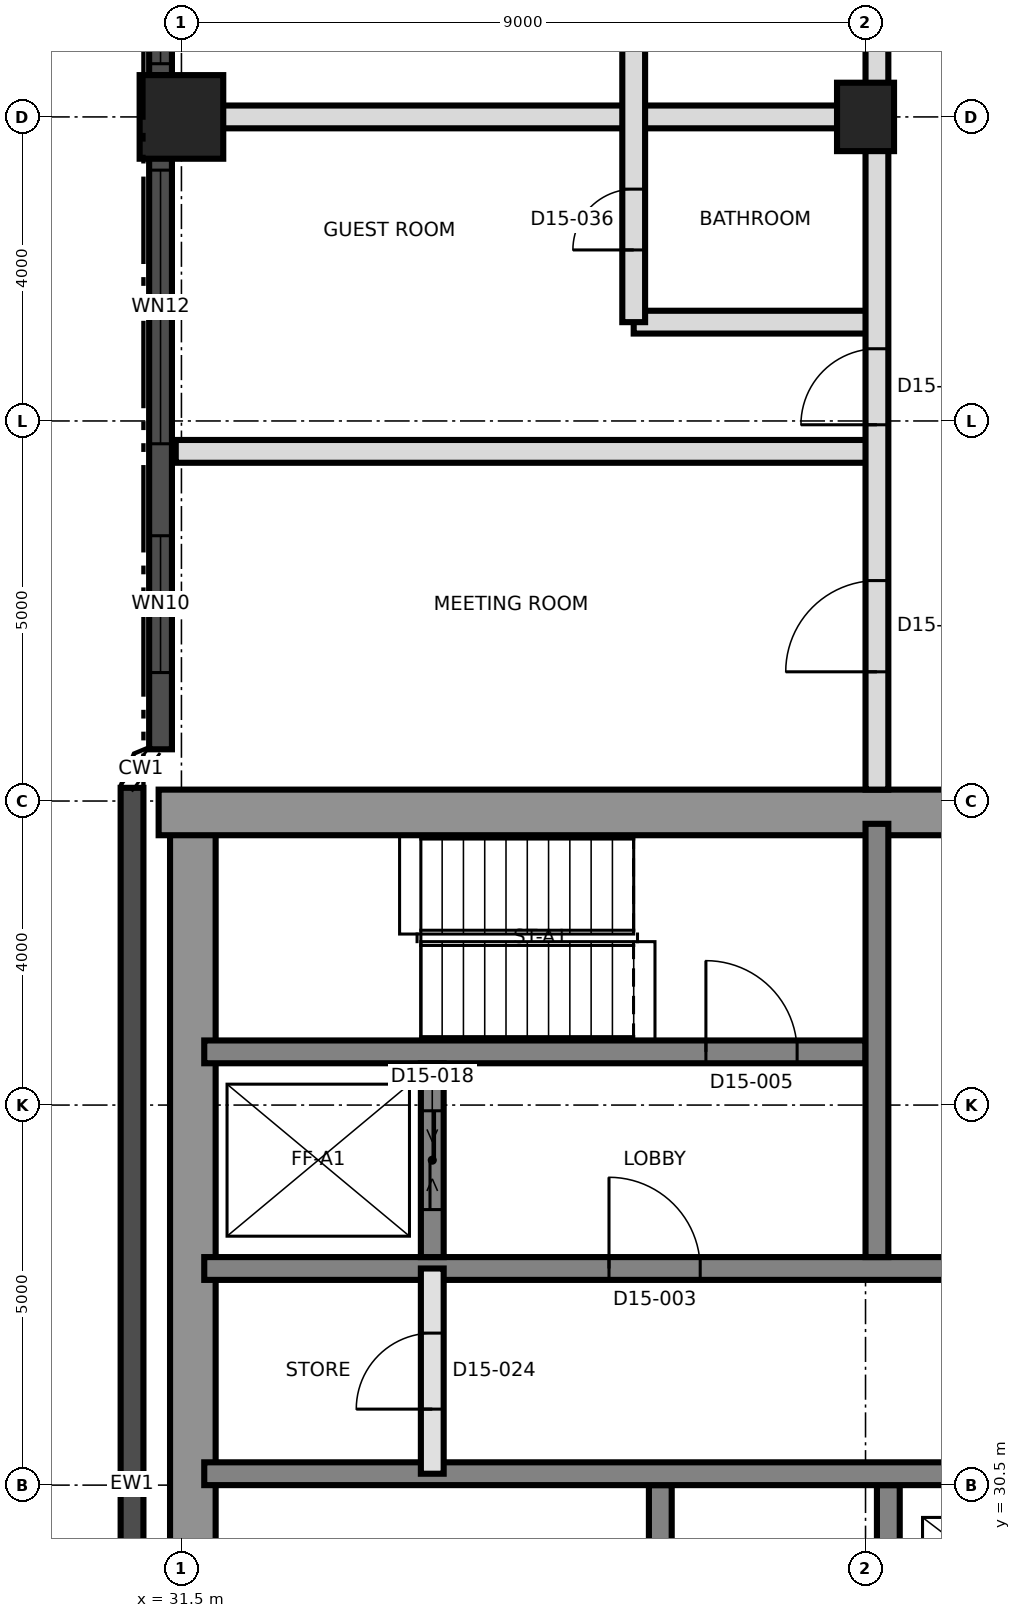
"""IFC4 building model, lengths in metres.
Left out: names, types, materials, properties, quantities, classifications, styles, units other than length and angle.
Written with IfcOpenShell. Run it as: python <this file> out.ifc"""

import sys

from ifc_helpers import new_model, si_unit, direction, frame, frame_2d, origin, origin_2d, place, context, subcontext, project, spatial, rectangle, extrude, element, fill, save


model = new_model("IFC4")
c1 = context("Model", 3, precision=1e-05, world=origin(), true_north=direction((0.0, 1.0)))
c2 = subcontext(c1, "Body", "Model", "MODEL_VIEW")
j1 = project(units=[si_unit("LENGTHUNIT", "METRE"), si_unit("PLANEANGLEUNIT", "RADIAN")], contexts=[c1])
p1 = place(None, origin())
s1 = spatial("IfcSite", under=j1, at=p1, CompositionType="ELEMENT")
p2 = place(p1, origin())
s2 = spatial("IfcBuilding", under=s1, at=p2, CompositionType="ELEMENT")
p3 = place(p2, frame((0.0, 0.0, 153.3)))
s3 = spatial("IfcBuildingStorey", under=s2, at=p3, CompositionType="ELEMENT", Elevation=153.3)
p4 = place(p3, frame((31.65, 21.8, 0.0), z_axis=(0.0, 0.0, 1.0), x_axis=(0.0, 1.0, 0.0)))
e1 = element("IfcWall", 1, at=p4, inside=s3, PredefinedType="SHEAR", context=c2, shape_type="SweptSolid", body=[
    extrude(rectangle(XDim=17.4, YDim=0.6, at=frame_2d((8.7, 0.0))), origin(), (0.0, 0.0, 1.0), 3.7),
])
p5 = place(p3, frame((31.2, 39.35, 0.0), z_axis=(0.0, 0.0, 1.0), x_axis=(1.0, 0.0, 0.0)))
e2 = element("IfcWall", 2, at=p5, inside=s3, PredefinedType="SHEAR", context=c2, shape_type="SweptSolid", body=[
    extrude(rectangle(XDim=27.0, YDim=0.6, at=frame_2d((13.5, 0.0))), origin(), (0.0, 0.0, 1.0), 3.7),
])
p6 = place(p5, frame((10.5, 0.0, 0.0)))
e3 = element("IfcOpeningElement", 3, at=p6, cuts=e2, PredefinedType="OPENING", context=c2, shape_type="SweptSolid", body=[
    extrude(rectangle(XDim=1.2, YDim=2.1, at=frame_2d((0.6, 1.05))), frame((0.0, 0.31, 0.0), z_axis=(0.0, -1.0, 0.0), x_axis=(1.0, 0.0, 0.0)), (0.0, 0.0, 1.0), 0.62),
])
p7 = place(p3, frame((37.8, 21.8, 0.0), z_axis=(0.0, 0.0, 1.0), x_axis=(0.0, 1.0, 0.0)))
e4 = element("IfcWall", 4, at=p7, inside=s3, PredefinedType="SHEAR", context=c2, shape_type="SweptSolid", body=[
    extrude(rectangle(XDim=8.7, YDim=0.3, at=frame_2d((4.35, 0.0))), origin(), (0.0, 0.0, 1.0), 3.7),
])
p8 = place(p7, frame((5.475, 0.0, 0.0)))
e5 = element("IfcOpeningElement", 5, at=p8, cuts=e4, PredefinedType="OPENING", context=c2, shape_type="SweptSolid", body=[
    extrude(rectangle(XDim=1.0, YDim=2.1, at=frame_2d((0.5, 1.05))), frame((0.0, 0.16, 0.0), z_axis=(0.0, -1.0, 0.0), x_axis=(1.0, 0.0, 0.0)), (0.0, 0.0, 1.0), 0.32),
])
p9 = place(p3, frame((40.8, 21.8, 0.0), z_axis=(0.0, 0.0, 1.0), x_axis=(0.0, 1.0, 0.0)))
e6 = element("IfcWall", 6, at=p9, inside=s3, PredefinedType="SHEAR", context=c2, shape_type="SweptSolid", body=[
    extrude(rectangle(XDim=8.7, YDim=0.3, at=frame_2d((4.35, 0.0))), origin(), (0.0, 0.0, 1.0), 3.7),
])
p10 = place(p9, frame((3.85, 0.0, 0.0)))
e7 = element("IfcOpeningElement", 7, at=p10, cuts=e6, PredefinedType="OPENING", context=c2, shape_type="SweptSolid", body=[
    extrude(rectangle(XDim=1.5, YDim=2.1, at=frame_2d((0.75, 1.05))), frame((0.0, 0.16, 0.0), z_axis=(0.0, -1.0, 0.0), x_axis=(1.0, 0.0, 0.0)), (0.0, 0.0, 1.0), 0.32),
])
p11 = place(p3, frame((31.8, 30.65, 0.0), z_axis=(0.0, 0.0, 1.0), x_axis=(1.0, 0.0, 0.0)))
e8 = element("IfcWall", 8, at=p11, inside=s3, PredefinedType="SHEAR", context=c2, shape_type="SweptSolid", body=[
    extrude(rectangle(XDim=26.4, YDim=0.3, at=frame_2d((13.2, 0.0))), origin(), (0.0, 0.0, 1.0), 3.7),
])
p12 = place(p11, frame((24.7, 0.0, 0.0)))
e9 = element("IfcOpeningElement", 9, at=p12, cuts=e8, PredefinedType="OPENING", context=c2, shape_type="SweptSolid", body=[
    extrude(rectangle(XDim=1.0, YDim=2.1, at=frame_2d((0.5, 1.05))), frame((0.0, 0.16, 0.0), z_axis=(0.0, -1.0, 0.0), x_axis=(1.0, 0.0, 0.0)), (0.0, 0.0, 1.0), 0.32),
])
p13 = place(p3, frame((31.8, 33.35, 0.0), z_axis=(0.0, 0.0, 1.0), x_axis=(1.0, 0.0, 0.0)))
e10 = element("IfcWall", 10, at=p13, inside=s3, PredefinedType="SHEAR", context=c2, shape_type="SweptSolid", body=[
    extrude(rectangle(XDim=26.4, YDim=0.3, at=frame_2d((13.2, 0.0))), origin(), (0.0, 0.0, 1.0), 3.7),
])
p14 = place(p13, frame((13.85, 0.0, 0.0)))
e11 = element("IfcOpeningElement", 11, at=p14, cuts=e10, PredefinedType="OPENING", context=c2, shape_type="SweptSolid", body=[
    extrude(rectangle(XDim=1.4, YDim=2.1, at=frame_2d((0.7, 1.05))), frame((0.0, 0.16, 0.0), z_axis=(0.0, -1.0, 0.0), x_axis=(1.0, 0.0, 0.0)), (0.0, 0.0, 1.0), 0.32),
])
p15 = place(p13, frame((5.325, 0.0, 0.0)))
e12 = element("IfcOpeningElement", 12, at=p15, cuts=e10, PredefinedType="OPENING", context=c2, shape_type="SweptSolid", body=[
    extrude(rectangle(XDim=1.2, YDim=2.1, at=frame_2d((0.6, 1.05))), frame((0.0, 0.16, 0.0), z_axis=(0.0, -1.0, 0.0), x_axis=(1.0, 0.0, 0.0)), (0.0, 0.0, 1.0), 0.32),
])
p16 = place(p13, frame((19.875, 0.0, 0.0)))
e13 = element("IfcOpeningElement", 13, at=p16, cuts=e10, PredefinedType="OPENING", context=c2, shape_type="SweptSolid", body=[
    extrude(rectangle(XDim=1.2, YDim=2.1, at=frame_2d((0.6, 1.05))), frame((0.0, 0.16, 0.0), z_axis=(0.0, -1.0, 0.0), x_axis=(1.0, 0.0, 0.0)), (0.0, 0.0, 1.0), 0.32),
])
p17 = place(p3, frame((31.8, 36.2, 0.0), z_axis=(0.0, 0.0, 1.0), x_axis=(1.0, 0.0, 0.0)))
e14 = element("IfcWall", 14, at=p17, inside=s3, PredefinedType="SHEAR", context=c2, shape_type="SweptSolid", body=[
    extrude(rectangle(XDim=8.7, YDim=0.3, at=frame_2d((4.35, 0.0))), origin(), (0.0, 0.0, 1.0), 3.7),
])
p18 = place(p17, frame((6.6, 0.0, 0.0)))
e15 = element("IfcOpeningElement", 15, at=p18, cuts=e14, PredefinedType="OPENING", context=c2, shape_type="SweptSolid", body=[
    extrude(rectangle(XDim=1.2, YDim=2.1, at=frame_2d((0.6, 1.05))), frame((0.0, 0.16, 0.0), z_axis=(0.0, -1.0, 0.0), x_axis=(1.0, 0.0, 0.0)), (0.0, 0.0, 1.0), 0.32),
])
p19 = place(p3, frame((40.65, 33.5, 0.0), z_axis=(0.0, 0.0, 1.0), x_axis=(0.0, 1.0, 0.0)))
e16 = element("IfcWall", 16, at=p19, inside=s3, PredefinedType="SHEAR", context=c2, shape_type="SweptSolid", body=[
    extrude(rectangle(XDim=5.7, YDim=0.3, at=frame_2d((2.85, 0.0))), origin(), (0.0, 0.0, 1.0), 3.7),
])
p20 = place(p3, frame((34.8, 33.5, 0.0), z_axis=(0.0, 0.0, 1.0), x_axis=(0.0, 1.0, 0.0)))
e17 = element("IfcWall", 17, at=p20, inside=s3, PredefinedType="SHEAR", context=c2, shape_type="SweptSolid", body=[
    extrude(rectangle(XDim=2.55, YDim=0.3, at=frame_2d((1.275, 0.0))), origin(), (0.0, 0.0, 1.0), 3.7),
])
p21 = place(p20, frame((0.625, 0.0, 0.0)))
e18 = element("IfcOpeningElement", 18, at=p21, cuts=e17, PredefinedType="OPENING", context=c2, shape_type="SweptSolid", body=[
    extrude(rectangle(XDim=1.3, YDim=2.4, at=frame_2d((0.65, 1.2))), frame((0.0, 0.16, 0.0), z_axis=(0.0, -1.0, 0.0), x_axis=(1.0, 0.0, 0.0)), (0.0, 0.0, 1.0), 0.32),
])
p22 = place(p3, frame((31.5, 48.5, 0.0), z_axis=(0.0, 0.0, 1.0), x_axis=(1.0, 0.0, 0.0)))
e19 = element("IfcColumn", 19, at=p22, inside=s3, PredefinedType="COLUMN", context=c2, shape_type="SweptSolid", body=[
    extrude(rectangle(XDim=1.1, YDim=1.1, at=origin_2d()), origin(), (0.0, 0.0, 1.0), 3.7),
])
p23 = place(p3, frame((40.5, 48.5, 0.0), z_axis=(0.0, 0.0, 1.0), x_axis=(0.0, 1.0, 0.0)))
e20 = element("IfcColumn", 20, at=p23, inside=s3, PredefinedType="COLUMN", context=c2, shape_type="SweptSolid", body=[
    extrude(rectangle(XDim=0.9, YDim=0.75, at=origin_2d()), origin(), (0.0, 0.0, 1.0), 3.7),
])
p24 = place(p3, frame((31.225, 56.95, 0.0), z_axis=(0.0, 0.0, 1.0), x_axis=(0.0, -1.0, 0.0)))
e21 = element("IfcWall", 21, at=p24, inside=s3, PredefinedType="SOLIDWALL", context=c2, shape_type="SweptSolid", body=[
    extrude(rectangle(XDim=7.9, YDim=0.3, at=frame_2d((3.95, 0.0))), origin(), (0.0, 0.0, 1.0), 2.8),
])
p25 = place(p24, frame((0.15, 0.0, 0.9)))
e22 = element("IfcOpeningElement", 22, at=p25, cuts=e21, PredefinedType="OPENING", context=c2, shape_type="SweptSolid", body=[
    extrude(rectangle(XDim=3.6, YDim=1.5, at=frame_2d((1.8, 0.75))), frame((0.0, 0.16, 0.0), z_axis=(0.0, -1.0, 0.0), x_axis=(1.0, 0.0, 0.0)), (0.0, 0.0, 1.0), 0.32),
])
p26 = place(p24, frame((4.15, 0.0, 0.9)))
e23 = element("IfcOpeningElement", 23, at=p26, cuts=e21, PredefinedType="OPENING", context=c2, shape_type="SweptSolid", body=[
    extrude(rectangle(XDim=3.6, YDim=1.5, at=frame_2d((1.8, 0.75))), frame((0.0, 0.16, 0.0), z_axis=(0.0, -1.0, 0.0), x_axis=(1.0, 0.0, 0.0)), (0.0, 0.0, 1.0), 0.32),
])
p27 = place(p3, frame((31.225, 49.05, 0.0), z_axis=(0.0, 0.0, 1.0), x_axis=(0.0, -1.0, 0.0)))
e24 = element("IfcWall", 24, at=p27, inside=s3, PredefinedType="SOLIDWALL", context=c2, shape_type="SweptSolid", body=[
    extrude(rectangle(XDim=8.87, YDim=0.3, at=frame_2d((4.435, 0.0))), origin(), (0.0, 0.0, 1.0), 3.4),
])
p28 = place(p27, frame((1.25, 0.0, 0.9)))
e25 = element("IfcOpeningElement", 25, at=p28, cuts=e24, PredefinedType="OPENING", context=c2, shape_type="SweptSolid", body=[
    extrude(rectangle(XDim=3.6, YDim=1.5, at=frame_2d((1.8, 0.75))), frame((0.0, 0.16, 0.0), z_axis=(0.0, -1.0, 0.0), x_axis=(1.0, 0.0, 0.0)), (0.0, 0.0, 1.0), 0.32),
])
p29 = place(p27, frame((6.06, 0.0, 0.3)))
e26 = element("IfcOpeningElement", 26, at=p29, cuts=e24, PredefinedType="OPENING", context=c2, shape_type="SweptSolid", body=[
    extrude(rectangle(XDim=1.8, YDim=2.4, at=frame_2d((0.9, 1.2))), frame((0.0, 0.16, 0.0), z_axis=(0.0, -1.0, 0.0), x_axis=(1.0, 0.0, 0.0)), (0.0, 0.0, 1.0), 0.32),
])
p30 = place(p3, frame((30.85, 39.674, 0.0), z_axis=(0.0, 0.0, 1.0), x_axis=(0.0, -1.0, 0.0)))
e27 = element("IfcWall", 27, at=p30, inside=s3, PredefinedType="SOLIDWALL", context=c2, shape_type="SweptSolid", body=[
    extrude(rectangle(XDim=18.314, YDim=0.3, at=frame_2d((9.157, 0.0))), origin(), (0.0, 0.0, 1.0), 3.4),
])
p31 = place(p3, frame((34.8, 30.65, 0.0), z_axis=(0.0, 0.0, 1.0), x_axis=(0.0, 1.0, 0.0)))
e28 = element("IfcWall", 28, at=p31, inside=s3, PredefinedType="SOLIDWALL", context=c2, shape_type="SweptSolid", body=[
    extrude(rectangle(XDim=2.7, YDim=0.3, at=frame_2d((1.35, 0.0))), origin(), (0.0, 0.0, 1.0), 3.4),
])
p32 = place(p31, frame((0.85, 0.0, 0.0)))
e29 = element("IfcOpeningElement", 29, at=p32, cuts=e28, PredefinedType="OPENING", context=c2, shape_type="SweptSolid", body=[
    extrude(rectangle(XDim=1.0, YDim=2.1, at=frame_2d((0.5, 1.05))), frame((0.0, 0.16, 0.0), z_axis=(0.0, -1.0, 0.0), x_axis=(1.0, 0.0, 0.0)), (0.0, 0.0, 1.0), 0.32),
])
p33 = place(p3, frame((31.425, 44.1, 0.0), z_axis=(0.0, 0.0, 1.0), x_axis=(1.0, 0.0, 0.0)))
e30 = element("IfcWall", 30, at=p33, inside=s3, PredefinedType="PARTITIONING", context=c2, shape_type="SweptSolid", body=[
    extrude(rectangle(XDim=9.225, YDim=0.3, at=frame_2d((4.612, 0.0))), origin(), (0.0, 0.0, 1.0), 3.4),
])
p34 = place(p3, frame((37.45, 45.8, 0.0), z_axis=(0.0, 0.0, 1.0), x_axis=(1.0, 0.0, 0.0)))
e31 = element("IfcWall", 31, at=p34, inside=s3, PredefinedType="PARTITIONING", context=c2, shape_type="SweptSolid", body=[
    extrude(rectangle(XDim=3.2, YDim=0.3, at=frame_2d((1.6, 0.0))), origin(), (0.0, 0.0, 1.0), 3.4),
])
p35 = place(p3, frame((31.425, 48.5, 0.0), z_axis=(0.0, 0.0, 1.0), x_axis=(1.0, 0.0, 0.0)))
e32 = element("IfcWall", 32, at=p35, inside=s3, PredefinedType="PARTITIONING", context=c2, shape_type="SweptSolid", body=[
    extrude(rectangle(XDim=9.225, YDim=0.3, at=frame_2d((4.612, 0.0))), origin(), (0.0, 0.0, 1.0), 3.4),
])
p36 = place(p3, frame((37.45, 45.8, 0.0), z_axis=(0.0, 0.0, 1.0), x_axis=(0.0, 1.0, 0.0)))
e33 = element("IfcWall", 33, at=p36, inside=s3, PredefinedType="PARTITIONING", context=c2, shape_type="SweptSolid", body=[
    extrude(rectangle(XDim=5.4, YDim=0.3, at=frame_2d((2.7, 0.0))), origin(), (0.0, 0.0, 1.0), 3.4),
])
p37 = place(p36, frame((0.95, 0.0, 0.0)))
e34 = element("IfcOpeningElement", 34, at=p37, cuts=e33, PredefinedType="OPENING", context=c2, shape_type="SweptSolid", body=[
    extrude(rectangle(XDim=0.8, YDim=2.1, at=frame_2d((0.4, 1.05))), frame((0.0, 0.16, 0.0), z_axis=(0.0, -1.0, 0.0), x_axis=(1.0, 0.0, 0.0)), (0.0, 0.0, 1.0), 0.32),
])
p38 = place(p36, frame((3.65, 0.0, 0.0)))
e35 = element("IfcOpeningElement", 35, at=p38, cuts=e33, PredefinedType="OPENING", context=c2, shape_type="SweptSolid", body=[
    extrude(rectangle(XDim=0.8, YDim=2.1, at=frame_2d((0.4, 1.05))), frame((0.0, 0.16, 0.0), z_axis=(0.0, -1.0, 0.0), x_axis=(1.0, 0.0, 0.0)), (0.0, 0.0, 1.0), 0.32),
])
p39 = place(p3, frame((40.65, 39.65, 0.0), z_axis=(0.0, 0.0, 1.0), x_axis=(0.0, 1.0, 0.0)))
e36 = element("IfcWall", 36, at=p39, inside=s3, PredefinedType="PARTITIONING", context=c2, shape_type="SweptSolid", body=[
    extrude(rectangle(XDim=35.925, YDim=0.3, at=frame_2d((17.962, 0.0))), origin(), (0.0, 0.0, 1.0), 3.4),
])
p40 = place(p39, frame((1.55, 0.0, 0.0)))
e37 = element("IfcOpeningElement", 37, at=p40, cuts=e36, PredefinedType="OPENING", context=c2, shape_type="SweptSolid", body=[
    extrude(rectangle(XDim=1.2, YDim=2.1, at=frame_2d((0.6, 1.05))), frame((0.0, 0.16, 0.0), z_axis=(0.0, -1.0, 0.0), x_axis=(1.0, 0.0, 0.0)), (0.0, 0.0, 1.0), 0.32),
])
p41 = place(p39, frame((4.8, 0.0, 0.0)))
e38 = element("IfcOpeningElement", 38, at=p41, cuts=e36, PredefinedType="OPENING", context=c2, shape_type="SweptSolid", body=[
    extrude(rectangle(XDim=1.0, YDim=2.1, at=frame_2d((0.5, 1.05))), frame((0.0, 0.16, 0.0), z_axis=(0.0, -1.0, 0.0), x_axis=(1.0, 0.0, 0.0)), (0.0, 0.0, 1.0), 0.32),
])
p42 = place(p39, frame((12.265, 0.0, 0.0)))
e39 = element("IfcOpeningElement", 39, at=p42, cuts=e36, PredefinedType="OPENING", context=c2, shape_type="SweptSolid", body=[
    extrude(rectangle(XDim=1.0, YDim=2.1, at=frame_2d((0.5, 1.05))), frame((0.0, 0.16, 0.0), z_axis=(0.0, -1.0, 0.0), x_axis=(1.0, 0.0, 0.0)), (0.0, 0.0, 1.0), 0.32),
])
p43 = place(p39, frame((15.215, 0.0, 0.0)))
e40 = element("IfcOpeningElement", 40, at=p43, cuts=e36, PredefinedType="OPENING", context=c2, shape_type="SweptSolid", body=[
    extrude(rectangle(XDim=1.4, YDim=2.1, at=frame_2d((0.7, 1.05))), frame((0.0, 0.16, 0.0), z_axis=(0.0, -1.0, 0.0), x_axis=(1.0, 0.0, 0.0)), (0.0, 0.0, 1.0), 0.32),
])
p44 = place(p39, frame((21.35, 0.0, 0.0)))
e41 = element("IfcOpeningElement", 41, at=p44, cuts=e36, PredefinedType="OPENING", context=c2, shape_type="SweptSolid", body=[
    extrude(rectangle(XDim=1.0, YDim=2.4, at=frame_2d((0.5, 1.2))), frame((0.0, 0.16, 0.0), z_axis=(0.0, -1.0, 0.0), x_axis=(1.0, 0.0, 0.0)), (0.0, 0.0, 1.0), 0.32),
])
p45 = place(p26, origin())
e42 = element("IfcWindow", 42, at=p45, inside=s3, PartitioningType="SINGLE_PANEL", PredefinedType="WINDOW", context=c2, shape_type="SweptSolid", body=[
    extrude(rectangle(XDim=3.6, YDim=1.5, at=frame_2d((1.8, 0.75))), frame((0.0, 0.03, 0.0), z_axis=(0.0, -1.0, 0.0), x_axis=(1.0, 0.0, 0.0)), (0.0, 0.0, 1.0), 0.06),
])
fill(e23, e42)
p46 = place(p28, origin())
e43 = element("IfcWindow", 43, at=p46, inside=s3, PartitioningType="SINGLE_PANEL", PredefinedType="WINDOW", context=c2, shape_type="SweptSolid", body=[
    extrude(rectangle(XDim=3.6, YDim=1.5, at=frame_2d((1.8, 0.75))), frame((0.0, 0.03, 0.0), z_axis=(0.0, -1.0, 0.0), x_axis=(1.0, 0.0, 0.0)), (0.0, 0.0, 1.0), 0.06),
])
fill(e25, e43)
p47 = place(p29, origin())
e44 = element("IfcWindow", 44, at=p47, inside=s3, PartitioningType="SINGLE_PANEL", PredefinedType="WINDOW", context=c2, shape_type="SweptSolid", body=[
    extrude(rectangle(XDim=1.8, YDim=2.4, at=frame_2d((0.9, 1.2))), frame((0.0, 0.03, 0.0), z_axis=(0.0, -1.0, 0.0), x_axis=(1.0, 0.0, 0.0)), (0.0, 0.0, 1.0), 0.06),
])
fill(e26, e44)
p48 = place(p15, origin())
e45 = element("IfcDoor", 45, at=p48, inside=s3, OperationType="SINGLE_SWING_LEFT", PredefinedType="DOOR", context=c2, shape_type="SweptSolid", body=[
    extrude(rectangle(XDim=1.2, YDim=2.1, at=frame_2d((0.6, 1.05))), frame((0.0, 0.025, 0.0), z_axis=(0.0, -1.0, 0.0), x_axis=(1.0, 0.0, 0.0)), (0.0, 0.0, 1.0), 0.05),
])
fill(e12, e45)
p49 = place(p18, origin())
e46 = element("IfcDoor", 46, at=p49, inside=s3, OperationType="SINGLE_SWING_RIGHT", PredefinedType="DOOR", context=c2, shape_type="SweptSolid", body=[
    extrude(rectangle(XDim=1.2, YDim=2.1, at=frame_2d((0.6, 1.05))), frame((0.0, 0.025, 0.0), z_axis=(0.0, -1.0, 0.0), x_axis=(1.0, 0.0, 0.0)), (0.0, 0.0, 1.0), 0.05),
])
fill(e15, e46)
p50 = place(p21, origin())
e47 = element("IfcDoor", 47, at=p50, inside=s3, OperationType="SLIDING_TO_LEFT", PredefinedType="DOOR", context=c2, shape_type="SweptSolid", body=[
    extrude(rectangle(XDim=1.3, YDim=2.4, at=frame_2d((0.65, 1.2))), frame((0.0, 0.025, 0.0), z_axis=(0.0, -1.0, 0.0), x_axis=(1.0, 0.0, 0.0)), (0.0, 0.0, 1.0), 0.05),
])
fill(e18, e47)
p51 = place(p32, origin())
e48 = element("IfcDoor", 48, at=p51, inside=s3, OperationType="SINGLE_SWING_LEFT", PredefinedType="DOOR", context=c2, shape_type="SweptSolid", body=[
    extrude(rectangle(XDim=1.0, YDim=2.1, at=frame_2d((0.5, 1.05))), frame((0.0, 0.025, 0.0), z_axis=(0.0, -1.0, 0.0), x_axis=(1.0, 0.0, 0.0)), (0.0, 0.0, 1.0), 0.05),
])
fill(e29, e48)
p52 = place(p40, origin())
e49 = element("IfcDoor", 49, at=p52, inside=s3, OperationType="SINGLE_SWING_LEFT", PredefinedType="DOOR", context=c2, shape_type="SweptSolid", body=[
    extrude(rectangle(XDim=1.2, YDim=2.1, at=frame_2d((0.6, 1.05))), frame((0.0, 0.025, 0.0), z_axis=(0.0, -1.0, 0.0), x_axis=(1.0, 0.0, 0.0)), (0.0, 0.0, 1.0), 0.05),
])
fill(e37, e49)
p53 = place(p37, origin())
e50 = element("IfcDoor", 50, at=p53, inside=s3, OperationType="SINGLE_SWING_RIGHT", PredefinedType="DOOR", context=c2, shape_type="SweptSolid", body=[
    extrude(rectangle(XDim=0.8, YDim=2.1, at=frame_2d((0.4, 1.05))), frame((0.0, 0.025, 0.0), z_axis=(0.0, -1.0, 0.0), x_axis=(1.0, 0.0, 0.0)), (0.0, 0.0, 1.0), 0.05),
])
fill(e34, e50)
p54 = place(p41, origin())
e51 = element("IfcDoor", 51, at=p54, inside=s3, OperationType="SINGLE_SWING_LEFT", PredefinedType="DOOR", context=c2, shape_type="SweptSolid", body=[
    extrude(rectangle(XDim=1.0, YDim=2.1, at=frame_2d((0.5, 1.05))), frame((0.0, 0.025, 0.0), z_axis=(0.0, -1.0, 0.0), x_axis=(1.0, 0.0, 0.0)), (0.0, 0.0, 1.0), 0.05),
])
fill(e38, e51)
save(model, sys.argv[1])
